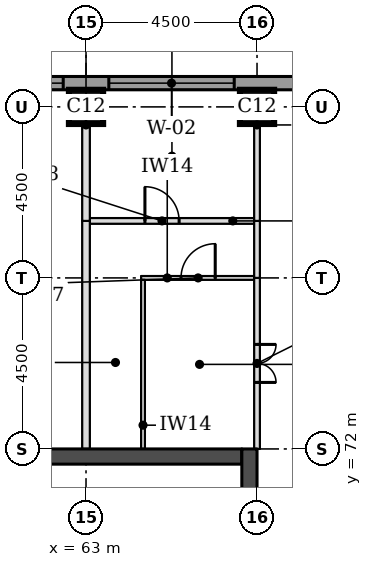
"""IFC4 building model, lengths in metres.
Left out: names, types, materials, properties, quantities, classifications, styles, units other than length and angle.
Written with IfcOpenShell. Run it as: python <this file> out.ifc"""

import sys

from ifc_helpers import new_model, si_unit, direction, frame, frame_2d, origin, origin_2d, place, context, subcontext, project, spatial, rectangle, extrude, element, fill, save


model = new_model("IFC4")
c1 = context("Model", 3, precision=1e-05, world=origin(), true_north=direction((0.0, 1.0)))
c2 = subcontext(c1, "Body", "Model", "MODEL_VIEW")
j1 = project(units=[si_unit("LENGTHUNIT", "METRE"), si_unit("PLANEANGLEUNIT", "RADIAN")], contexts=[c1])
p1 = place(None, origin())
s1 = spatial("IfcSite", under=j1, at=p1, CompositionType="ELEMENT")
p2 = place(p1, origin())
s2 = spatial("IfcBuilding", under=s1, at=p2, CompositionType="ELEMENT")
p3 = place(p2, frame((0.0, 0.0, 215.6)))
s3 = spatial("IfcBuildingStorey", under=s2, at=p3, CompositionType="ELEMENT", Elevation=215.6)
for number, where, z_axis, x_axis in (
    (1, (63.0, 81.0, 0.0), (0.0, 0.0, 1.0), (1.0, 0.0, 0.0)),
    (2, (67.5, 81.0, 0.0), (0.0, 0.0, 1.0), (1.0, 0.0, 0.0)),
):
    element("IfcColumn", number, at=place(p3, frame(where, z_axis=z_axis, x_axis=x_axis)), inside=s3, PredefinedType="COLUMN", context=c2, shape_type="SweptSolid", body=[
        extrude(rectangle(XDim=0.9, YDim=0.9, at=origin_2d()), origin(), (0.0, 0.0, 1.0), 3.7),
    ])
p4 = place(p3, frame((45.4, 71.8, 0.0), z_axis=(0.0, 0.0, 1.0), x_axis=(1.0, 0.0, 0.0)))
e3 = element("IfcWall", 3, at=p4, inside=s3, PredefinedType="SHEAR", context=c2, shape_type="SweptSolid", body=[
    extrude(rectangle(XDim=21.7, YDim=0.4, at=frame_2d((10.85, 0.0))), origin(), (0.0, 0.0, 1.0), 3.7),
])
p5 = place(p3, frame((67.3, 49.5, 0.0), z_axis=(0.0, 0.0, 1.0), x_axis=(0.0, 1.0, 0.0)))
e4 = element("IfcWall", 4, at=p5, inside=s3, PredefinedType="SHEAR", context=c2, shape_type="SweptSolid", body=[
    extrude(rectangle(XDim=22.5, YDim=0.4, at=frame_2d((11.25, 0.0))), origin(), (0.0, 0.0, 1.0), 3.7),
])
p6 = place(p5, frame((4.2, 0.0, 0.0)))
e5 = element("IfcOpeningElement", 5, at=p6, cuts=e4, PredefinedType="OPENING", context=c2, shape_type="SweptSolid", body=[
    extrude(rectangle(XDim=1.8, YDim=2.1, at=frame_2d((0.9, 1.05))), frame((0.0, 0.21, 0.0), z_axis=(0.0, -1.0, 0.0), x_axis=(1.0, 0.0, 0.0)), (0.0, 0.0, 1.0), 0.42),
])
p7 = place(p5, frame((6.9, 0.0, 0.0)))
e6 = element("IfcOpeningElement", 6, at=p7, cuts=e4, PredefinedType="OPENING", context=c2, shape_type="SweptSolid", body=[
    extrude(rectangle(XDim=1.1, YDim=2.1, at=frame_2d((0.55, 1.05))), frame((0.0, 0.21, 0.0), z_axis=(0.0, -1.0, 0.0), x_axis=(1.0, 0.0, 0.0)), (0.0, 0.0, 1.0), 0.42),
])
p8 = place(p5, frame((13.6, 0.0, 0.0)))
e7 = element("IfcOpeningElement", 7, at=p8, cuts=e4, PredefinedType="OPENING", context=c2, shape_type="SweptSolid", body=[
    extrude(rectangle(XDim=1.1, YDim=2.1, at=frame_2d((0.55, 1.05))), frame((0.0, 0.21, 0.0), z_axis=(0.0, -1.0, 0.0), x_axis=(1.0, 0.0, 0.0)), (0.0, 0.0, 1.0), 0.42),
])
p9 = place(p5, frame((16.5, 0.0, 0.0)))
e8 = element("IfcOpeningElement", 8, at=p9, cuts=e4, PredefinedType="OPENING", context=c2, shape_type="SweptSolid", body=[
    extrude(rectangle(XDim=1.8, YDim=2.1, at=frame_2d((0.9, 1.05))), frame((0.0, 0.21, 0.0), z_axis=(0.0, -1.0, 0.0), x_axis=(1.0, 0.0, 0.0)), (0.0, 0.0, 1.0), 0.42),
])
p10 = place(p3, frame((72.331, 81.625, 0.0), z_axis=(0.0, 0.0, 1.0), x_axis=(-1.0, 0.0, 0.0)))
e9 = element("IfcWall", 9, at=p10, inside=s3, PredefinedType="STANDARD", context=c2, shape_type="SweptSolid", body=[
    extrude(rectangle(XDim=32.163, YDim=0.35, at=frame_2d((16.081, 0.0))), origin(), (0.0, 0.0, 1.0), 3.525),
])
p11 = place(p10, frame((5.431, 0.0, 0.9)))
e10 = element("IfcOpeningElement", 10, at=p11, cuts=e9, PredefinedType="OPENING", context=c2, shape_type="SweptSolid", body=[
    extrude(rectangle(XDim=3.3, YDim=1.9, at=frame_2d((1.65, 0.95))), frame((0.0, 0.185, 0.0), z_axis=(0.0, -1.0, 0.0), x_axis=(1.0, 0.0, 0.0)), (0.0, 0.0, 1.0), 0.37),
])
p12 = place(p10, frame((9.931, 0.0, 0.9)))
e11 = element("IfcOpeningElement", 11, at=p12, cuts=e9, PredefinedType="OPENING", context=c2, shape_type="SweptSolid", body=[
    extrude(rectangle(XDim=3.3, YDim=1.9, at=frame_2d((1.65, 0.95))), frame((0.0, 0.185, 0.0), z_axis=(0.0, -1.0, 0.0), x_axis=(1.0, 0.0, 0.0)), (0.0, 0.0, 1.0), 0.37),
])
p13 = place(p10, frame((14.431, 0.0, 0.9)))
e12 = element("IfcOpeningElement", 12, at=p13, cuts=e9, PredefinedType="OPENING", context=c2, shape_type="SweptSolid", body=[
    extrude(rectangle(XDim=3.3, YDim=1.9, at=frame_2d((1.65, 0.95))), frame((0.0, 0.185, 0.0), z_axis=(0.0, -1.0, 0.0), x_axis=(1.0, 0.0, 0.0)), (0.0, 0.0, 1.0), 0.37),
])
p14 = place(p10, frame((18.931, 0.0, 0.9)))
e13 = element("IfcOpeningElement", 13, at=p14, cuts=e9, PredefinedType="OPENING", context=c2, shape_type="SweptSolid", body=[
    extrude(rectangle(XDim=3.3, YDim=1.9, at=frame_2d((1.65, 0.95))), frame((0.0, 0.185, 0.0), z_axis=(0.0, -1.0, 0.0), x_axis=(1.0, 0.0, 0.0)), (0.0, 0.0, 1.0), 0.37),
])
p15 = place(p10, frame((23.431, 0.0, 0.9)))
e14 = element("IfcOpeningElement", 14, at=p15, cuts=e9, PredefinedType="OPENING", context=c2, shape_type="SweptSolid", body=[
    extrude(rectangle(XDim=3.3, YDim=1.9, at=frame_2d((1.65, 0.95))), frame((0.0, 0.185, 0.0), z_axis=(0.0, -1.0, 0.0), x_axis=(1.0, 0.0, 0.0)), (0.0, 0.0, 1.0), 0.37),
])
p16 = place(p3, frame((64.45, 76.5, 0.0), z_axis=(0.0, 0.0, 1.0), x_axis=(1.0, 0.0, 0.0)))
e15 = element("IfcWall", 15, at=p16, inside=s3, PredefinedType="PARTITIONING", context=c2, shape_type="SweptSolid", body=[
    extrude(rectangle(XDim=2.975, YDim=0.1, at=frame_2d((1.488, 0.0))), origin(), (0.0, 0.0, 1.0), 3.55),
])
p17 = place(p16, frame((1.05, 0.0, 0.0)))
e16 = element("IfcOpeningElement", 16, at=p17, cuts=e15, PredefinedType="OPENING", context=c2, shape_type="SweptSolid", body=[
    extrude(rectangle(XDim=0.9, YDim=2.1, at=frame_2d((0.45, 1.05))), frame((0.0, 0.06, 0.0), z_axis=(0.0, -1.0, 0.0), x_axis=(1.0, 0.0, 0.0)), (0.0, 0.0, 1.0), 0.12),
])
p18 = place(p3, frame((63.1, 78.0, 0.0), z_axis=(0.0, 0.0, 1.0), x_axis=(1.0, 0.0, 0.0)))
e17 = element("IfcWall", 17, at=p18, inside=s3, PredefinedType="PARTITIONING", context=c2, shape_type="SweptSolid", body=[
    extrude(rectangle(XDim=4.325, YDim=0.15, at=frame_2d((2.163, 0.0))), origin(), (0.0, 0.0, 1.0), 3.55),
])
p19 = place(p18, frame((1.45, 0.0, 0.0)))
e18 = element("IfcOpeningElement", 18, at=p19, cuts=e17, PredefinedType="OPENING", context=c2, shape_type="SweptSolid", body=[
    extrude(rectangle(XDim=0.9, YDim=2.1, at=frame_2d((0.45, 1.05))), frame((0.0, 0.085, 0.0), z_axis=(0.0, -1.0, 0.0), x_axis=(1.0, 0.0, 0.0)), (0.0, 0.0, 1.0), 0.17),
])
p20 = place(p3, frame((63.0, 72.0, 0.0), z_axis=(0.0, 0.0, 1.0), x_axis=(0.0, 1.0, 0.0)))
e19 = element("IfcWall", 19, at=p20, inside=s3, PredefinedType="PARTITIONING", context=c2, shape_type="SweptSolid", body=[
    extrude(rectangle(XDim=6.0, YDim=0.2, at=frame_2d((3.0, 0.0))), origin(), (0.0, 0.0, 1.0), 3.55),
])
p21 = place(p3, frame((64.5, 72.0, 0.0), z_axis=(0.0, 0.0, 1.0), x_axis=(0.0, 1.0, 0.0)))
e20 = element("IfcWall", 20, at=p21, inside=s3, PredefinedType="PARTITIONING", context=c2, shape_type="SweptSolid", body=[
    extrude(rectangle(XDim=4.45, YDim=0.1, at=frame_2d((2.225, 0.0))), origin(), (0.0, 0.0, 1.0), 3.55),
])
p22 = place(p3, frame((67.5, 72.0, 0.0), z_axis=(0.0, 0.0, 1.0), x_axis=(0.0, 1.0, 0.0)))
e21 = element("IfcWall", 21, at=p22, inside=s3, PredefinedType="PARTITIONING", context=c2, shape_type="SweptSolid", body=[
    extrude(rectangle(XDim=4.5, YDim=0.15, at=frame_2d((2.25, 0.0))), origin(), (0.0, 0.0, 1.0), 3.022),
])
p23 = place(p22, frame((1.75, 0.0, 0.0)))
e22 = element("IfcOpeningElement", 22, at=p23, cuts=e21, PredefinedType="OPENING", context=c2, shape_type="SweptSolid", body=[
    extrude(rectangle(XDim=1.0, YDim=2.1, at=frame_2d((0.5, 1.05))), frame((0.0, 0.085, 0.0), z_axis=(0.0, -1.0, 0.0), x_axis=(1.0, 0.0, 0.0)), (0.0, 0.0, 1.0), 0.17),
])
p24 = place(p3, frame((67.5, 76.5, 0.0), z_axis=(0.0, 0.0, 1.0), x_axis=(0.0, 1.0, 0.0)))
e23 = element("IfcWall", 23, at=p24, inside=s3, PredefinedType="PARTITIONING", context=c2, shape_type="SweptSolid", body=[
    extrude(rectangle(XDim=1.5, YDim=0.15, at=frame_2d((0.75, 0.0))), origin(), (0.0, 0.0, 1.0), 3.022),
])
p25 = place(p3, frame((63.0, 78.0, 0.0), z_axis=(0.0, 0.0, 1.0), x_axis=(0.0, 1.0, 0.0)))
e24 = element("IfcWall", 24, at=p25, inside=s3, PredefinedType="PARTITIONING", context=c2, shape_type="SweptSolid", body=[
    extrude(rectangle(XDim=3.45, YDim=0.2, at=frame_2d((1.725, 0.0))), origin(), (0.0, 0.0, 1.0), 3.55),
])
p26 = place(p3, frame((67.5, 78.0, 0.0), z_axis=(0.0, 0.0, 1.0), x_axis=(0.0, 1.0, 0.0)))
e25 = element("IfcWall", 25, at=p26, inside=s3, PredefinedType="PARTITIONING", context=c2, shape_type="SweptSolid", body=[
    extrude(rectangle(XDim=3.45, YDim=0.15, at=frame_2d((1.725, 0.0))), origin(), (0.0, 0.0, 1.0), 3.022),
])
p27 = place(p11, origin())
e26 = element("IfcWindow", 26, at=p27, inside=s3, PartitioningType="SINGLE_PANEL", PredefinedType="WINDOW", context=c2, shape_type="SweptSolid", body=[
    extrude(rectangle(XDim=3.3, YDim=1.9, at=frame_2d((1.65, 0.95))), frame((0.0, 0.085, 0.0), z_axis=(0.0, -1.0, 0.0), x_axis=(1.0, 0.0, 0.0)), (0.0, 0.0, 1.0), 0.06),
])
fill(e10, e26)
p28 = place(p12, origin())
e27 = element("IfcWindow", 27, at=p28, inside=s3, PartitioningType="SINGLE_PANEL", PredefinedType="WINDOW", context=c2, shape_type="SweptSolid", body=[
    extrude(rectangle(XDim=3.3, YDim=1.9, at=frame_2d((1.65, 0.95))), frame((0.0, 0.085, 0.0), z_axis=(0.0, -1.0, 0.0), x_axis=(1.0, 0.0, 0.0)), (0.0, 0.0, 1.0), 0.06),
])
fill(e11, e27)
p29 = place(p23, frame((1.0, 0.0, 0.0), z_axis=(0.0, 0.0, 1.0), x_axis=(-1.0, 0.0, 0.0)))
e28 = element("IfcDoor", 28, at=p29, inside=s3, OperationType="DOUBLE_DOOR_SINGLE_SWING", PredefinedType="DOOR", context=c2, shape_type="SweptSolid", body=[
    extrude(rectangle(XDim=1.0, YDim=2.1, at=frame_2d((0.5, 1.05))), frame((0.0, 0.025, 0.0), z_axis=(0.0, -1.0, 0.0), x_axis=(1.0, 0.0, 0.0)), (0.0, 0.0, 1.0), 0.05),
])
fill(e22, e28)
p30 = place(p17, origin())
e29 = element("IfcDoor", 29, at=p30, inside=s3, OperationType="SINGLE_SWING_RIGHT", PredefinedType="DOOR", context=c2, shape_type="SweptSolid", body=[
    extrude(rectangle(XDim=0.9, YDim=2.1, at=frame_2d((0.45, 1.05))), frame((0.0, 0.025, 0.0), z_axis=(0.0, -1.0, 0.0), x_axis=(1.0, 0.0, 0.0)), (0.0, 0.0, 1.0), 0.05),
])
fill(e16, e29)
p31 = place(p19, origin())
e30 = element("IfcDoor", 30, at=p31, inside=s3, OperationType="SINGLE_SWING_LEFT", PredefinedType="DOOR", context=c2, shape_type="SweptSolid", body=[
    extrude(rectangle(XDim=0.9, YDim=2.1, at=frame_2d((0.45, 1.05))), frame((0.0, 0.025, 0.0), z_axis=(0.0, -1.0, 0.0), x_axis=(1.0, 0.0, 0.0)), (0.0, 0.0, 1.0), 0.05),
])
fill(e18, e30)
save(model, sys.argv[1])
